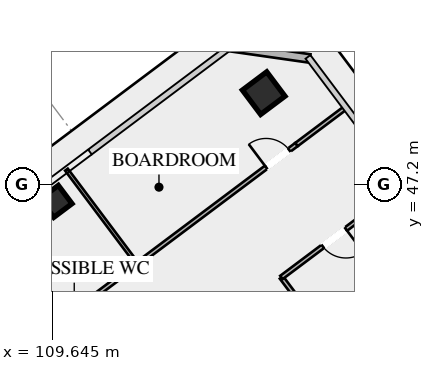
"""IFC4 building model, lengths in metres.
Left out: names, types, materials, properties, quantities, classifications, styles, units other than length and angle.
Written with IfcOpenShell. Run it as: python <this file> out.ifc"""

import sys

from ifc_helpers import new_model, si_unit, direction, frame, frame_2d, origin, origin_2d, place, context, subcontext, project, spatial, rectangle, hollow_rectangle, extrude, element, fill, save


model = new_model("IFC4")
c1 = context("Model", 3, precision=1e-05, world=origin(), true_north=direction((0.0, 1.0)))
c2 = subcontext(c1, "Body", "Model", "MODEL_VIEW")
j1 = project(units=[si_unit("LENGTHUNIT", "METRE"), si_unit("PLANEANGLEUNIT", "RADIAN")], contexts=[c1])
p1 = place(None, origin())
s1 = spatial("IfcSite", under=j1, at=p1, CompositionType="ELEMENT")
p2 = place(p1, origin())
s2 = spatial("IfcBuilding", under=s1, at=p2, CompositionType="ELEMENT")
p3 = place(p2, frame((0.0, 0.0, 232.6)))
s3 = spatial("IfcBuildingStorey", under=s2, at=p3, CompositionType="ELEMENT", Elevation=232.6)
p4 = place(p3, frame((116.6, 50.2, -0.175), z_axis=(0.0, 0.0, 1.0), x_axis=(0.799999996291, 0.600000004945, 0.0)))
e1 = element("IfcColumn", 1, at=p4, inside=s3, PredefinedType="COLUMN", context=c2, shape_type="SweptSolid", body=[
    extrude(hollow_rectangle(XDim=1.0, YDim=1.0, WallThickness=0.04, at=origin_2d()), origin(), (0.0, 0.0, 1.0), 3.545),
])
p5 = place(p3, frame((109.77, 46.64, -0.175), z_axis=(0.0, 0.0, 1.0), x_axis=(0.799999996291, 0.600000004945, 0.0)))
e2 = element("IfcColumn", 2, at=p5, inside=s3, PredefinedType="COLUMN", context=c2, shape_type="SweptSolid", body=[
    extrude(hollow_rectangle(XDim=0.75, YDim=0.75, WallThickness=0.032, at=origin_2d()), origin(), (0.0, 0.0, 1.0), 3.545),
])
p6 = place(p3, frame((115.46, 51.72, 0.0), z_axis=(0.0, 0.0, 1.0), x_axis=(0.989956760759, -0.141370477216, 0.0)))
e3 = element("IfcWall", 3, at=p6, inside=s3, PredefinedType="SOLIDWALL", context=c2, shape_type="SweptSolid", body=[
    extrude(rectangle(XDim=2.687, YDim=0.28, at=frame_2d((1.344, 0.0))), origin(), (0.0, 0.0, 1.0), 3.37),
])
p7 = place(p3, frame((119.824, 40.618, 0.0), z_axis=(0.0, 0.0, 1.0), x_axis=(-0.599982243973, 0.800013316712, 0.0)))
e4 = element("IfcWall", 4, at=p7, inside=s3, PredefinedType="PARTITIONING", context=c2, shape_type="SweptSolid", body=[
    extrude(rectangle(XDim=4.4, YDim=0.135, at=frame_2d((2.2, 0.0))), origin(), (0.0, 0.0, 1.0), 2.723),
])
p8 = place(p3, frame((99.736, 35.052, 0.0), z_axis=(0.0, 0.0, 1.0), x_axis=(0.799997387685, 0.600003483071, 0.0)))
e5 = element("IfcWall", 5, at=p8, inside=s3, PredefinedType="PARTITIONING", context=c2, shape_type="SweptSolid", body=[
    extrude(rectangle(XDim=22.43, YDim=0.135, at=frame_2d((11.215, 0.0))), origin(), (0.0, 0.0, 1.0), 2.723),
])
p9 = place(p8, frame((0.3, 0.0, 0.0)))
e6 = element("IfcOpeningElement", 6, at=p9, cuts=e5, PredefinedType="OPENING", context=c2, shape_type="SweptSolid", body=[
    extrude(rectangle(XDim=0.95, YDim=2.05, at=frame_2d((0.475, 1.025))), frame((0.0, 0.077, 0.0), z_axis=(0.0, -1.0, 0.0), x_axis=(1.0, 0.0, 0.0)), (0.0, 0.0, 1.0), 0.155),
])
p10 = place(p8, frame((9.423, 0.0, 0.0)))
e7 = element("IfcOpeningElement", 7, at=p10, cuts=e5, PredefinedType="OPENING", context=c2, shape_type="SweptSolid", body=[
    extrude(rectangle(XDim=0.95, YDim=2.05, at=frame_2d((0.475, 1.025))), frame((0.0, 0.077, 0.0), z_axis=(0.0, -1.0, 0.0), x_axis=(1.0, 0.0, 0.0)), (0.0, 0.0, 1.0), 0.155),
])
p11 = place(p8, frame((21.18, 0.0, 0.0)))
e8 = element("IfcOpeningElement", 8, at=p11, cuts=e5, PredefinedType="OPENING", context=c2, shape_type="SweptSolid", body=[
    extrude(rectangle(XDim=0.95, YDim=2.05, at=frame_2d((0.475, 1.025))), frame((0.0, 0.077, 0.0), z_axis=(0.0, -1.0, 0.0), x_axis=(1.0, 0.0, 0.0)), (0.0, 0.0, 1.0), 0.155),
])
p12 = place(p3, frame((117.68, 48.51, 0.0), z_axis=(0.0, 0.0, 1.0), x_axis=(0.8, 0.6, 0.0)))
e9 = element("IfcWall", 9, at=p12, inside=s3, PredefinedType="PARTITIONING", context=c2, shape_type="SweptSolid", body=[
    extrude(rectangle(XDim=2.03, YDim=0.135, at=frame_2d((1.015, 0.0))), origin(), (0.0, 0.0, 1.0), 2.723),
])
p13 = place(p3, frame((112.392, 44.644, 0.0), z_axis=(0.0, 0.0, 1.0), x_axis=(-0.6, 0.8, 0.0)))
e10 = element("IfcWall", 10, at=p13, inside=s3, PredefinedType="PARTITIONING", context=c2, shape_type="SweptSolid", body=[
    extrude(rectangle(XDim=3.8, YDim=0.11, at=frame_2d((1.9, 0.0))), origin(), (0.0, 0.0, 1.0), 2.723),
])
p14 = place(p3, frame((121.224, 47.168, 0.0), z_axis=(0.0, 0.0, 1.0), x_axis=(-0.8, -0.6, 0.0)))
e11 = element("IfcWall", 11, at=p14, inside=s3, PredefinedType="PARTITIONING", context=c2, shape_type="SweptSolid", body=[
    extrude(rectangle(XDim=5.05, YDim=0.135, at=frame_2d((2.525, 0.0))), origin(), (0.0, 0.0, 1.0), 2.723),
])
p15 = place(p14, frame((2.4, 0.0, 0.0)))
e12 = element("IfcOpeningElement", 12, at=p15, cuts=e11, PredefinedType="OPENING", context=c2, shape_type="SweptSolid", body=[
    extrude(rectangle(XDim=0.95, YDim=2.05, at=frame_2d((0.475, 1.025))), frame((0.0, 0.077, 0.0), z_axis=(0.0, -1.0, 0.0), x_axis=(1.0, 0.0, 0.0)), (0.0, 0.0, 1.0), 0.155),
])
p16 = place(p11, origin())
e13 = element("IfcDoor", 13, at=p16, inside=s3, OperationType="SINGLE_SWING_LEFT", PredefinedType="DOOR", context=c2, shape_type="SweptSolid", body=[
    extrude(rectangle(XDim=0.95, YDim=2.05, at=frame_2d((0.475, 1.025))), frame((0.0, 0.025, 0.0), z_axis=(0.0, -1.0, 0.0), x_axis=(1.0, 0.0, 0.0)), (0.0, 0.0, 1.0), 0.05),
])
fill(e8, e13)
p17 = place(p15, origin())
e14 = element("IfcDoor", 14, at=p17, inside=s3, OperationType="SINGLE_SWING_LEFT", PredefinedType="DOOR", context=c2, shape_type="SweptSolid", body=[
    extrude(rectangle(XDim=0.95, YDim=2.05, at=frame_2d((0.475, 1.025))), frame((0.0, 0.025, 0.0), z_axis=(0.0, -1.0, 0.0), x_axis=(1.0, 0.0, 0.0)), (0.0, 0.0, 1.0), 0.05),
])
fill(e12, e14)
save(model, sys.argv[1])
